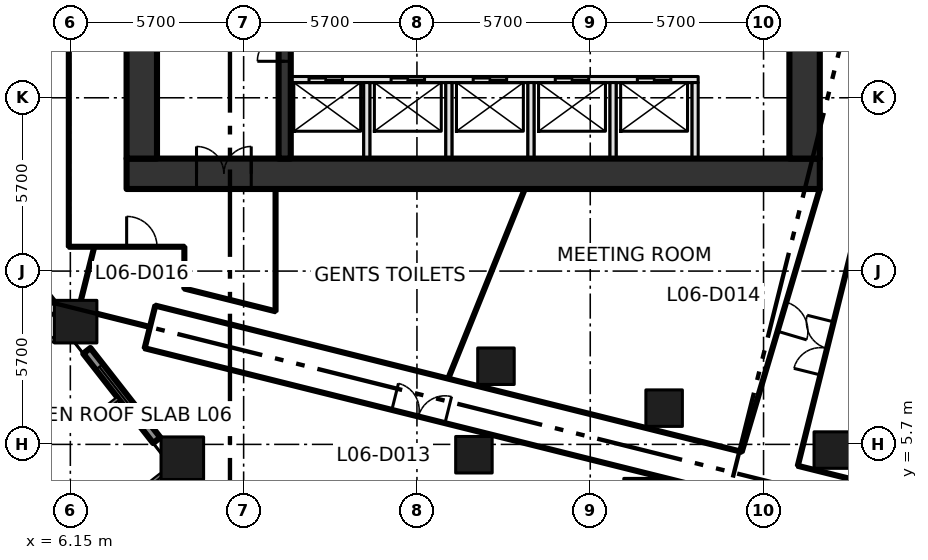
"""IFC4 building model, lengths in metres.
Left out: names, types, materials, properties, quantities, classifications, styles, units other than length and angle.
Written with IfcOpenShell. Run it as: python <this file> out.ifc"""

import sys

from ifc_helpers import new_model, si_unit, direction, frame, frame_2d, origin, origin_2d, place, context, subcontext, project, spatial, rectangle, extrude, element, fill, save


model = new_model("IFC4")
c1 = context("Model", 3, precision=1e-05, world=origin(), true_north=direction((0.0, 1.0)))
c2 = subcontext(c1, "Body", "Model", "MODEL_VIEW")
j1 = project(units=[si_unit("LENGTHUNIT", "METRE"), si_unit("PLANEANGLEUNIT", "RADIAN")], contexts=[c1])
p1 = place(None, origin())
s1 = spatial("IfcSite", under=j1, at=p1, CompositionType="ELEMENT")
p2 = place(p1, origin())
s2 = spatial("IfcBuilding", under=s1, at=p2, CompositionType="ELEMENT")
p3 = place(p2, frame((0.0, 0.0, 33.0)))
s3 = spatial("IfcBuildingStorey", under=s2, at=p3, CompositionType="ELEMENT", Elevation=33.0)
for number, where, z_axis, x_axis in (
    (1, (9.833, 5.245, 0.0), (0.0, 0.0, 1.0), (1.0, 0.0, 0.0)),
    (2, (6.323, 9.737, 0.0), (0.0, 0.0, 1.0), (1.0, 0.0, 0.0)),
):
    element("IfcColumn", number, at=place(p3, frame(where, z_axis=z_axis, x_axis=x_axis)), inside=s3, PredefinedType="COLUMN", context=c2, shape_type="SweptSolid", body=[
        extrude(rectangle(XDim=1.4, YDim=1.4, at=origin_2d()), origin(), (0.0, 0.0, 1.0), 4.2),
    ])
for number, where, z_axis, x_axis in (
    (3, (19.424, 5.36, 0.0), (0.0, 0.0, 1.0), (1.0, 0.0, 0.0)),
    (4, (24.954, 3.981, 0.0), (0.0, 0.0, 1.0), (1.0, 0.0, 0.0)),
    (5, (20.149, 8.271, 0.0), (0.0, 0.0, 1.0), (1.0, 0.0, 0.0)),
    (6, (25.68, 6.892, 0.0), (0.0, 0.0, 1.0), (1.0, 0.0, 0.0)),
    (7, (31.211, 5.513, 0.0), (0.0, 0.0, 1.0), (1.0, 0.0, 0.0)),
):
    element("IfcColumn", number, at=place(p3, frame(where, z_axis=z_axis, x_axis=x_axis)), inside=s3, PredefinedType="COLUMN", context=c2, shape_type="SweptSolid", body=[
        extrude(rectangle(XDim=1.2, YDim=1.2, at=origin_2d()), origin(), (0.0, 0.0, 1.0), 4.2),
    ])
p4 = place(p3, frame((8.0, 14.6, -0.45), z_axis=(0.0, 0.0, 1.0), x_axis=(1.0, 0.0, 0.0)))
e8 = element("IfcWall", 8, at=p4, inside=s3, PredefinedType="SHEAR", context=c2, shape_type="SweptSolid", body=[
    extrude(rectangle(XDim=22.8, YDim=1.0, at=frame_2d((11.4, 0.0))), origin(), (0.0, 0.0, 1.0), 4.35),
])
p5 = place(p4, frame((2.3, 0.0, 0.45)))
e9 = element("IfcOpeningElement", 9, at=p5, cuts=e8, PredefinedType="OPENING", context=c2, shape_type="SweptSolid", body=[
    extrude(rectangle(XDim=1.8, YDim=2.1, at=frame_2d((0.9, 1.05))), frame((0.0, 0.51, 0.0), z_axis=(0.0, -1.0, 0.0), x_axis=(1.0, 0.0, 0.0)), (0.0, 0.0, 1.0), 1.02),
])
for number, where, z_axis, x_axis in (
    (10, (8.5, 15.1, -0.45), (0.0, 0.0, 1.0), (0.0, 1.0, 0.0)),
    (11, (30.3, 15.1, -0.45), (0.0, 0.0, 1.0), (0.0, 1.0, 0.0)),
):
    element("IfcWall", number, at=place(p3, frame(where, z_axis=z_axis, x_axis=x_axis)), inside=s3, PredefinedType="SHEAR", context=c2, shape_type="SweptSolid", body=[
        extrude(rectangle(XDim=20.6, YDim=1.0, at=frame_2d((10.3, 0.0))), origin(), (0.0, 0.0, 1.0), 4.35),
    ])
p6 = place(p3, frame((13.4, 17.7, 0.0), z_axis=(0.0, 0.0, 1.0), x_axis=(1.0, 0.0, 0.0)))
e12 = element("IfcWall", 12, at=p6, inside=s3, PredefinedType="SOLIDWALL", context=c2, shape_type="SweptSolid", body=[
    extrude(rectangle(XDim=13.4, YDim=0.2, at=frame_2d((6.7, 0.0))), origin(), (0.0, 0.0, 1.0), 3.9),
])
p7 = place(p6, frame((0.6, 0.0, 0.0)))
e13 = element("IfcOpeningElement", 13, at=p7, cuts=e12, PredefinedType="OPENING", context=c2, shape_type="SweptSolid", body=[
    extrude(rectangle(XDim=1.1, YDim=2.1, at=frame_2d((0.55, 1.05))), frame((0.0, 0.11, 0.0), z_axis=(0.0, -1.0, 0.0), x_axis=(1.0, 0.0, 0.0)), (0.0, 0.0, 1.0), 0.22),
])
p8 = place(p6, frame((3.3, 0.0, 0.0)))
e14 = element("IfcOpeningElement", 14, at=p8, cuts=e12, PredefinedType="OPENING", context=c2, shape_type="SweptSolid", body=[
    extrude(rectangle(XDim=1.1, YDim=2.1, at=frame_2d((0.55, 1.05))), frame((0.0, 0.11, 0.0), z_axis=(0.0, -1.0, 0.0), x_axis=(1.0, 0.0, 0.0)), (0.0, 0.0, 1.0), 0.22),
])
p9 = place(p6, frame((6.0, 0.0, 0.0)))
e15 = element("IfcOpeningElement", 15, at=p9, cuts=e12, PredefinedType="OPENING", context=c2, shape_type="SweptSolid", body=[
    extrude(rectangle(XDim=1.1, YDim=2.1, at=frame_2d((0.55, 1.05))), frame((0.0, 0.11, 0.0), z_axis=(0.0, -1.0, 0.0), x_axis=(1.0, 0.0, 0.0)), (0.0, 0.0, 1.0), 0.22),
])
p10 = place(p6, frame((8.7, 0.0, 0.0)))
e16 = element("IfcOpeningElement", 16, at=p10, cuts=e12, PredefinedType="OPENING", context=c2, shape_type="SweptSolid", body=[
    extrude(rectangle(XDim=1.1, YDim=2.1, at=frame_2d((0.55, 1.05))), frame((0.0, 0.11, 0.0), z_axis=(0.0, -1.0, 0.0), x_axis=(1.0, 0.0, 0.0)), (0.0, 0.0, 1.0), 0.22),
])
p11 = place(p6, frame((11.4, 0.0, 0.0)))
e17 = element("IfcOpeningElement", 17, at=p11, cuts=e12, PredefinedType="OPENING", context=c2, shape_type="SweptSolid", body=[
    extrude(rectangle(XDim=1.1, YDim=2.1, at=frame_2d((0.55, 1.05))), frame((0.0, 0.11, 0.0), z_axis=(0.0, -1.0, 0.0), x_axis=(1.0, 0.0, 0.0)), (0.0, 0.0, 1.0), 0.22),
])
p12 = place(p3, frame((13.2, 15.1, 0.0), z_axis=(0.0, 0.0, 1.0), x_axis=(0.0, 1.0, 0.0)))
e18 = element("IfcWall", 18, at=p12, inside=s3, PredefinedType="SHEAR", context=c2, shape_type="SweptSolid", body=[
    extrude(rectangle(XDim=20.6, YDim=0.4, at=frame_2d((10.3, 0.0))), origin(), (0.0, 0.0, 1.0), 3.9),
])
p13 = place(p12, frame((3.2, 0.0, 0.0)))
e19 = element("IfcOpeningElement", 19, at=p13, cuts=e18, PredefinedType="OPENING", context=c2, shape_type="SweptSolid", body=[
    extrude(rectangle(XDim=1.8, YDim=2.1, at=frame_2d((0.9, 1.05))), frame((0.0, 0.21, 0.0), z_axis=(0.0, -1.0, 0.0), x_axis=(1.0, 0.0, 0.0)), (0.0, 0.0, 1.0), 0.42),
])
p14 = place(p12, frame((11.3, 0.0, 0.0)))
e20 = element("IfcOpeningElement", 20, at=p14, cuts=e18, PredefinedType="OPENING", context=c2, shape_type="SweptSolid", body=[
    extrude(rectangle(XDim=1.2, YDim=2.1, at=frame_2d((0.6, 1.05))), frame((0.0, 0.21, 0.0), z_axis=(0.0, -1.0, 0.0), x_axis=(1.0, 0.0, 0.0)), (0.0, 0.0, 1.0), 0.42),
])
for number, where, z_axis, x_axis in (
    (21, (15.9, 15.1, 0.0), (0.0, 0.0, 1.0), (0.0, 1.0, 0.0)),
    (22, (18.6, 15.1, 0.0), (0.0, 0.0, 1.0), (0.0, 1.0, 0.0)),
    (23, (21.3, 15.1, 0.0), (0.0, 0.0, 1.0), (0.0, 1.0, 0.0)),
    (24, (24.0, 15.1, 0.0), (0.0, 0.0, 1.0), (0.0, 1.0, 0.0)),
    (25, (26.7, 15.1, 0.0), (0.0, 0.0, 1.0), (0.0, 1.0, 0.0)),
):
    element("IfcWall", number, at=place(p3, frame(where, z_axis=z_axis, x_axis=x_axis)), inside=s3, PredefinedType="SOLIDWALL", context=c2, shape_type="SweptSolid", body=[
        extrude(rectangle(XDim=2.5, YDim=0.2, at=frame_2d((1.25, 0.0))), origin(), (0.0, 0.0, 1.0), 3.9),
    ])
p15 = place(p3, frame((3.183, 13.27, 0.0), z_axis=(0.0, 0.0, 1.0), x_axis=(0.615564114897, -0.788086810225, 0.0)))
e26 = element("IfcWall", 26, at=p15, inside=s3, PredefinedType="SOLIDWALL", context=c2, shape_type="SweptSolid", body=[
    extrude(rectangle(XDim=3.735, YDim=0.3, at=frame_2d((1.867, 0.0))), origin(), (0.0, 0.0, 1.0), 3.1),
])
p16 = place(p15, frame((0.667, 0.0, 0.8)))
e27 = element("IfcOpeningElement", 27, at=p16, cuts=e26, PredefinedType="OPENING", context=c2, shape_type="SweptSolid", body=[
    extrude(rectangle(XDim=2.4, YDim=2.1, at=frame_2d((1.2, 1.05))), frame((0.0, 0.16, 0.0), z_axis=(0.0, -1.0, 0.0), x_axis=(1.0, 0.0, 0.0)), (0.0, 0.0, 1.0), 0.32),
])
p17 = place(p3, frame((6.692, 8.778, 0.0), z_axis=(0.0, 0.0, 1.0), x_axis=(0.615767067156, -0.787928244833, 0.0)))
e28 = element("IfcWall", 28, at=p17, inside=s3, PredefinedType="SOLIDWALL", context=c2, shape_type="SweptSolid", body=[
    extrude(rectangle(XDim=3.735, YDim=0.3, at=frame_2d((1.868, 0.0))), origin(), (0.0, 0.0, 1.0), 3.1),
])
p18 = place(p17, frame((0.668, 0.0, 0.8)))
e29 = element("IfcOpeningElement", 29, at=p18, cuts=e28, PredefinedType="OPENING", context=c2, shape_type="SweptSolid", body=[
    extrude(rectangle(XDim=2.4, YDim=2.1, at=frame_2d((1.2, 1.05))), frame((0.0, 0.16, 0.0), z_axis=(0.0, -1.0, 0.0), x_axis=(1.0, 0.0, 0.0)), (0.0, 0.0, 1.0), 0.32),
])
p19 = place(p3, frame((11.707, -11.659, 0.0), z_axis=(0.0, 0.0, 1.0), x_axis=(-0.61565155533, 0.788018503856, 0.0)))
e30 = element("IfcWall", 30, at=p19, inside=s3, PredefinedType="PARAPET", context=c2, shape_type="SweptSolid", body=[
    extrude(rectangle(XDim=32.79, YDim=0.25, at=frame_2d((16.395, 0.0))), origin(), (0.0, 0.0, 1.0), 1.2),
])
p20 = place(p3, frame((6.1, 12.2, 0.0), z_axis=(0.0, 0.0, 1.0), x_axis=(1.0, 0.0, 0.0)))
e31 = element("IfcWall", 31, at=p20, inside=s3, PredefinedType="PARTITIONING", context=c2, shape_type="SweptSolid", body=[
    extrude(rectangle(XDim=3.8, YDim=0.1, at=frame_2d((1.9, 0.0))), origin(), (0.0, 0.0, 1.0), 3.9),
])
p21 = place(p20, frame((1.902, 0.0, 0.0)))
e32 = element("IfcOpeningElement", 32, at=p21, cuts=e31, PredefinedType="OPENING", context=c2, shape_type="SweptSolid", body=[
    extrude(rectangle(XDim=1.0, YDim=2.1, at=frame_2d((0.5, 1.05))), frame((0.0, 0.06, 0.0), z_axis=(0.0, -1.0, 0.0), x_axis=(1.0, 0.0, 0.0)), (0.0, 0.0, 1.0), 0.12),
])
p22 = place(p3, frame((6.1, 38.9, 0.0), z_axis=(0.0, 0.0, 1.0), x_axis=(0.0, -1.0, 0.0)))
e33 = element("IfcWall", 33, at=p22, inside=s3, PredefinedType="PARTITIONING", context=c2, shape_type="SweptSolid", body=[
    extrude(rectangle(XDim=26.7, YDim=0.1, at=frame_2d((13.35, 0.0))), origin(), (0.0, 0.0, 1.0), 3.9),
])
p23 = place(p22, frame((18.568, 0.0, 0.0)))
e34 = element("IfcOpeningElement", 34, at=p23, cuts=e33, PredefinedType="OPENING", context=c2, shape_type="SweptSolid", body=[
    extrude(rectangle(XDim=1.0, YDim=2.1, at=frame_2d((0.5, 1.05))), frame((0.0, 0.06, 0.0), z_axis=(0.0, -1.0, 0.0), x_axis=(1.0, 0.0, 0.0)), (0.0, 0.0, 1.0), 0.12),
])
p24 = place(p22, frame((4.68, 0.0, 0.0)))
e35 = element("IfcOpeningElement", 35, at=p24, cuts=e33, PredefinedType="OPENING", context=c2, shape_type="SweptSolid", body=[
    extrude(rectangle(XDim=1.8, YDim=2.1, at=frame_2d((0.9, 1.05))), frame((0.0, 0.06, 0.0), z_axis=(0.0, -1.0, 0.0), x_axis=(1.0, 0.0, 0.0)), (0.0, 0.0, 1.0), 0.12),
])
p25 = place(p3, frame((8.594, 8.862, 0.0), z_axis=(0.0, 0.0, 1.0), x_axis=(0.970293746648, -0.241929835316, 0.0)))
e36 = element("IfcWall", 36, at=p25, inside=s3, PredefinedType="PARTITIONING", context=c2, shape_type="SweptSolid", body=[
    extrude(rectangle(XDim=68.375, YDim=0.1, at=frame_2d((34.188, 0.0))), origin(), (0.0, 0.0, 1.0), 3.9),
])
p26 = place(p25, frame((37.708, 0.0, 0.0)))
e37 = element("IfcOpeningElement", 37, at=p26, cuts=e36, PredefinedType="OPENING", context=c2, shape_type="SweptSolid", body=[
    extrude(rectangle(XDim=1.0, YDim=2.1, at=frame_2d((0.5, 1.05))), frame((0.0, 0.06, 0.0), z_axis=(0.0, -1.0, 0.0), x_axis=(1.0, 0.0, 0.0)), (0.0, 0.0, 1.0), 0.12),
])
p27 = place(p25, frame((42.708, 0.0, 0.0)))
e38 = element("IfcOpeningElement", 38, at=p27, cuts=e36, PredefinedType="OPENING", context=c2, shape_type="SweptSolid", body=[
    extrude(rectangle(XDim=1.8, YDim=2.1, at=frame_2d((0.9, 1.05))), frame((0.0, 0.06, 0.0), z_axis=(0.0, -1.0, 0.0), x_axis=(1.0, 0.0, 0.0)), (0.0, 0.0, 1.0), 0.12),
])
p28 = place(p25, frame((58.508, 0.0, 0.0)))
e39 = element("IfcOpeningElement", 39, at=p28, cuts=e36, PredefinedType="OPENING", context=c2, shape_type="SweptSolid", body=[
    extrude(rectangle(XDim=1.8, YDim=2.1, at=frame_2d((0.9, 1.05))), frame((0.0, 0.06, 0.0), z_axis=(0.0, -1.0, 0.0), x_axis=(1.0, 0.0, 0.0)), (0.0, 0.0, 1.0), 0.12),
])
p29 = place(p25, frame((25.408, 0.0, 0.0)))
e40 = element("IfcOpeningElement", 40, at=p29, cuts=e36, PredefinedType="OPENING", context=c2, shape_type="SweptSolid", body=[
    extrude(rectangle(XDim=1.8, YDim=2.1, at=frame_2d((0.9, 1.05))), frame((0.0, 0.06, 0.0), z_axis=(0.0, -1.0, 0.0), x_axis=(1.0, 0.0, 0.0)), (0.0, 0.0, 1.0), 0.12),
])
p30 = place(p25, frame((31.308, 0.0, 0.0)))
e41 = element("IfcOpeningElement", 41, at=p30, cuts=e36, PredefinedType="OPENING", context=c2, shape_type="SweptSolid", body=[
    extrude(rectangle(XDim=1.0, YDim=2.1, at=frame_2d((0.5, 1.05))), frame((0.0, 0.06, 0.0), z_axis=(0.0, -1.0, 0.0), x_axis=(1.0, 0.0, 0.0)), (0.0, 0.0, 1.0), 0.12),
])
p31 = place(p25, frame((8.38, 0.0, 0.0)))
e42 = element("IfcOpeningElement", 42, at=p31, cuts=e36, PredefinedType="OPENING", context=c2, shape_type="SweptSolid", body=[
    extrude(rectangle(XDim=1.8, YDim=2.1, at=frame_2d((0.9, 1.05))), frame((0.0, 0.06, 0.0), z_axis=(0.0, -1.0, 0.0), x_axis=(1.0, 0.0, 0.0)), (0.0, 0.0, 1.0), 0.12),
])
p32 = place(p3, frame((8.944, 10.264, 0.0), z_axis=(0.0, 0.0, 1.0), x_axis=(0.970300504447, -0.241902730595, 0.0)))
e43 = element("IfcWall", 43, at=p32, inside=s3, PredefinedType="PARTITIONING", context=c2, shape_type="SweptSolid", body=[
    extrude(rectangle(XDim=19.879, YDim=0.1, at=frame_2d((9.939, 0.0))), origin(), (0.0, 0.0, 1.0), 3.9),
])
p33 = place(p3, frame((8.944, 10.264, 0.0), z_axis=(0.0, 0.0, 1.0), x_axis=(-0.242297077633, -0.970202105837, 0.0)))
e44 = element("IfcWall", 44, at=p33, inside=s3, PredefinedType="PARTITIONING", context=c2, shape_type="SweptSolid", body=[
    extrude(rectangle(XDim=1.445, YDim=0.1, at=frame_2d((0.722, 0.0))), origin(), (0.0, 0.0, 1.0), 3.9),
])
p34 = place(p3, frame((9.9, 10.826, 0.0), z_axis=(0.0, 0.0, 1.0), x_axis=(0.970290953223, -0.241941038466, 0.0)))
e45 = element("IfcWall", 45, at=p34, inside=s3, PredefinedType="PARTITIONING", context=c2, shape_type="SweptSolid", body=[
    extrude(rectangle(XDim=3.092, YDim=0.1, at=frame_2d((1.546, 0.0))), origin(), (0.0, 0.0, 1.0), 3.9),
])
p35 = place(p3, frame((9.9, 12.2, 0.0), z_axis=(0.0, 0.0, 1.0), x_axis=(0.0, -1.0, 0.0)))
e46 = element("IfcWall", 46, at=p35, inside=s3, PredefinedType="PARTITIONING", context=c2, shape_type="SweptSolid", body=[
    extrude(rectangle(XDim=1.374, YDim=0.1, at=frame_2d((0.687, 0.0))), origin(), (0.0, 0.0, 1.0), 3.9),
])
p36 = place(p3, frame((12.9, 10.078, 0.0), z_axis=(0.0, 0.0, 1.0), x_axis=(0.0, 1.0, 0.0)))
e47 = element("IfcWall", 47, at=p36, inside=s3, PredefinedType="PARTITIONING", context=c2, shape_type="SweptSolid", body=[
    extrude(rectangle(XDim=4.022, YDim=0.1, at=frame_2d((2.011, 0.0))), origin(), (0.0, 0.0, 1.0), 3.9),
])
p37 = place(p3, frame((30.076, 4.995, 0.0), z_axis=(0.0, 0.0, 1.0), x_axis=(0.97029302478, -0.24193273045, 0.0)))
e48 = element("IfcWall", 48, at=p37, inside=s3, PredefinedType="PARTITIONING", context=c2, shape_type="SweptSolid", body=[
    extrude(rectangle(XDim=46.596, YDim=0.1, at=frame_2d((23.298, 0.0))), origin(), (0.0, 0.0, 1.0), 3.9),
])
p38 = place(p37, frame((25.229, 0.0, 0.0)))
e49 = element("IfcOpeningElement", 49, at=p38, cuts=e48, PredefinedType="OPENING", context=c2, shape_type="SweptSolid", body=[
    extrude(rectangle(XDim=1.0, YDim=2.1, at=frame_2d((0.5, 1.05))), frame((0.0, 0.06, 0.0), z_axis=(0.0, -1.0, 0.0), x_axis=(1.0, 0.0, 0.0)), (0.0, 0.0, 1.0), 0.12),
])
p39 = place(p37, frame((31.828, 0.0, 0.0)))
e50 = element("IfcOpeningElement", 50, at=p39, cuts=e48, PredefinedType="OPENING", context=c2, shape_type="SweptSolid", body=[
    extrude(rectangle(XDim=1.8, YDim=2.1, at=frame_2d((0.9, 1.05))), frame((0.0, 0.06, 0.0), z_axis=(0.0, -1.0, 0.0), x_axis=(1.0, 0.0, 0.0)), (0.0, 0.0, 1.0), 0.12),
])
p40 = place(p37, frame((42.429, 0.0, 0.0)))
e51 = element("IfcOpeningElement", 51, at=p40, cuts=e48, PredefinedType="OPENING", context=c2, shape_type="SweptSolid", body=[
    extrude(rectangle(XDim=1.0, YDim=2.1, at=frame_2d((0.5, 1.05))), frame((0.0, 0.06, 0.0), z_axis=(0.0, -1.0, 0.0), x_axis=(1.0, 0.0, 0.0)), (0.0, 0.0, 1.0), 0.12),
])
p41 = place(p37, frame((14.629, 0.0, 0.0)))
e52 = element("IfcOpeningElement", 52, at=p41, cuts=e48, PredefinedType="OPENING", context=c2, shape_type="SweptSolid", body=[
    extrude(rectangle(XDim=1.8, YDim=2.1, at=frame_2d((0.9, 1.05))), frame((0.0, 0.06, 0.0), z_axis=(0.0, -1.0, 0.0), x_axis=(1.0, 0.0, 0.0)), (0.0, 0.0, 1.0), 0.12),
])
p42 = place(p3, frame((30.076, 4.995, 0.0), z_axis=(0.0, 0.0, 1.0), x_axis=(0.241944155572, 0.97029017597, 0.0)))
e53 = element("IfcWall", 53, at=p42, inside=s3, PredefinedType="PARTITIONING", context=c2, shape_type="SweptSolid", body=[
    extrude(rectangle(XDim=8.353, YDim=0.1, at=frame_2d((4.177, 0.0))), origin(), (0.0, 0.0, 1.0), 3.9),
])
p43 = place(p42, frame((3.08, 0.0, 0.0)))
e54 = element("IfcOpeningElement", 54, at=p43, cuts=e53, PredefinedType="OPENING", context=c2, shape_type="SweptSolid", body=[
    extrude(rectangle(XDim=1.8, YDim=2.1, at=frame_2d((0.9, 1.05))), frame((0.0, 0.06, 0.0), z_axis=(0.0, -1.0, 0.0), x_axis=(1.0, 0.0, 0.0)), (0.0, 0.0, 1.0), 0.12),
])
p44 = place(p3, frame((30.8, 14.1, 0.0), z_axis=(0.0, 0.0, 1.0), x_axis=(-0.284664373847, -0.95862724469, 0.0)))
e55 = element("IfcWall", 55, at=p44, inside=s3, PredefinedType="PARTITIONING", context=c2, shape_type="SweptSolid", body=[
    extrude(rectangle(XDim=9.018, YDim=0.1, at=frame_2d((4.509, 0.0))), origin(), (0.0, 0.0, 1.0), 3.9),
])
p45 = place(p44, frame((3.88, 0.0, 0.0)))
e56 = element("IfcOpeningElement", 56, at=p45, cuts=e55, PredefinedType="OPENING", context=c2, shape_type="SweptSolid", body=[
    extrude(rectangle(XDim=1.0, YDim=2.1, at=frame_2d((0.5, 1.05))), frame((0.0, 0.06, 0.0), z_axis=(0.0, -1.0, 0.0), x_axis=(1.0, 0.0, 0.0)), (0.0, 0.0, 1.0), 0.12),
])
p46 = place(p3, frame((6.922, 12.138, 0.0), z_axis=(0.0, 0.0, 1.0), x_axis=(-0.242437328426, -0.970167069007, 0.0)))
e57 = element("IfcWall", 57, at=p46, inside=s3, PredefinedType="PARTITIONING", context=c2, shape_type="SweptSolid", body=[
    extrude(rectangle(XDim=1.753, YDim=0.1, at=frame_2d((0.876, 0.0))), origin(), (0.0, 0.0, 1.0), 3.9),
])
p47 = place(p3, frame((8.72, 9.574, 0.0), z_axis=(0.0, 0.0, 1.0), x_axis=(-0.97016712555, 0.242437102155, 0.0)))
e58 = element("IfcWall", 58, at=p47, inside=s3, PredefinedType="PARTITIONING", context=c2, shape_type="SweptSolid", body=[
    extrude(rectangle(XDim=1.749, YDim=0.1, at=frame_2d((0.875, 0.0))), origin(), (0.0, 0.0, 1.0), 3.9),
])
p48 = place(p3, frame((18.599, 7.915, 0.0), z_axis=(0.0, 0.0, 1.0), x_axis=(0.374461839275, 0.927242325892, 0.0)))
e59 = element("IfcWall", 59, at=p48, inside=s3, PredefinedType="PARTITIONING", context=c2, shape_type="SweptSolid", body=[
    extrude(rectangle(XDim=6.67, YDim=0.1, at=frame_2d((3.335, 0.0))), origin(), (0.0, 0.0, 1.0), 3.9),
])
p49 = place(p7, origin())
e60 = element("IfcDoor", 60, at=p49, inside=s3, OperationType="SLIDING_TO_LEFT", PredefinedType="DOOR", context=c2, shape_type="SweptSolid", body=[
    extrude(rectangle(XDim=1.1, YDim=2.1, at=frame_2d((0.55, 1.05))), frame((0.0, 0.025, 0.0), z_axis=(0.0, -1.0, 0.0), x_axis=(1.0, 0.0, 0.0)), (0.0, 0.0, 1.0), 0.05),
])
fill(e13, e60)
p50 = place(p8, origin())
e61 = element("IfcDoor", 61, at=p50, inside=s3, OperationType="SLIDING_TO_LEFT", PredefinedType="DOOR", context=c2, shape_type="SweptSolid", body=[
    extrude(rectangle(XDim=1.1, YDim=2.1, at=frame_2d((0.55, 1.05))), frame((0.0, 0.025, 0.0), z_axis=(0.0, -1.0, 0.0), x_axis=(1.0, 0.0, 0.0)), (0.0, 0.0, 1.0), 0.05),
])
fill(e14, e61)
p51 = place(p9, origin())
e62 = element("IfcDoor", 62, at=p51, inside=s3, OperationType="SLIDING_TO_LEFT", PredefinedType="DOOR", context=c2, shape_type="SweptSolid", body=[
    extrude(rectangle(XDim=1.1, YDim=2.1, at=frame_2d((0.55, 1.05))), frame((0.0, 0.025, 0.0), z_axis=(0.0, -1.0, 0.0), x_axis=(1.0, 0.0, 0.0)), (0.0, 0.0, 1.0), 0.05),
])
fill(e15, e62)
p52 = place(p10, origin())
e63 = element("IfcDoor", 63, at=p52, inside=s3, OperationType="SLIDING_TO_LEFT", PredefinedType="DOOR", context=c2, shape_type="SweptSolid", body=[
    extrude(rectangle(XDim=1.1, YDim=2.1, at=frame_2d((0.55, 1.05))), frame((0.0, 0.025, 0.0), z_axis=(0.0, -1.0, 0.0), x_axis=(1.0, 0.0, 0.0)), (0.0, 0.0, 1.0), 0.05),
])
fill(e16, e63)
p53 = place(p11, origin())
e64 = element("IfcDoor", 64, at=p53, inside=s3, OperationType="SLIDING_TO_LEFT", PredefinedType="DOOR", context=c2, shape_type="SweptSolid", body=[
    extrude(rectangle(XDim=1.1, YDim=2.1, at=frame_2d((0.55, 1.05))), frame((0.0, 0.025, 0.0), z_axis=(0.0, -1.0, 0.0), x_axis=(1.0, 0.0, 0.0)), (0.0, 0.0, 1.0), 0.05),
])
fill(e17, e64)
p54 = place(p13, origin())
e65 = element("IfcDoor", 65, at=p54, inside=s3, OperationType="DOUBLE_DOOR_SINGLE_SWING", PredefinedType="DOOR", context=c2, shape_type="SweptSolid", body=[
    extrude(rectangle(XDim=1.8, YDim=2.1, at=frame_2d((0.9, 1.05))), frame((0.0, 0.025, 0.0), z_axis=(0.0, -1.0, 0.0), x_axis=(1.0, 0.0, 0.0)), (0.0, 0.0, 1.0), 0.05),
])
fill(e19, e65)
p55 = place(p5, origin())
e66 = element("IfcDoor", 66, at=p55, inside=s3, OperationType="DOUBLE_DOOR_SINGLE_SWING", PredefinedType="DOOR", context=c2, shape_type="SweptSolid", body=[
    extrude(rectangle(XDim=1.8, YDim=2.1, at=frame_2d((0.9, 1.05))), frame((0.0, 0.025, 0.0), z_axis=(0.0, -1.0, 0.0), x_axis=(1.0, 0.0, 0.0)), (0.0, 0.0, 1.0), 0.05),
])
fill(e9, e66)
p56 = place(p18, origin())
e67 = element("IfcWindow", 67, at=p56, inside=s3, PartitioningType="DOUBLE_PANEL_VERTICAL", PredefinedType="WINDOW", context=c2, shape_type="SweptSolid", body=[
    extrude(rectangle(XDim=2.4, YDim=2.1, at=frame_2d((1.2, 1.05))), frame((0.0, 0.03, 0.0), z_axis=(0.0, -1.0, 0.0), x_axis=(1.0, 0.0, 0.0)), (0.0, 0.0, 1.0), 0.06),
])
fill(e29, e67)
p57 = place(p31, origin())
e68 = element("IfcDoor", 68, at=p57, inside=s3, OperationType="DOUBLE_DOOR_SINGLE_SWING", PredefinedType="DOOR", context=c2, shape_type="SweptSolid", body=[
    extrude(rectangle(XDim=1.8, YDim=2.1, at=frame_2d((0.9, 1.05))), frame((0.0, 0.025, 0.0), z_axis=(0.0, -1.0, 0.0), x_axis=(1.0, 0.0, 0.0)), (0.0, 0.0, 1.0), 0.05),
])
fill(e42, e68)
p58 = place(p45, origin())
e69 = element("IfcDoor", 69, at=p58, inside=s3, OperationType="SINGLE_SWING_RIGHT", PredefinedType="DOOR", context=c2, shape_type="SweptSolid", body=[
    extrude(rectangle(XDim=1.0, YDim=2.1, at=frame_2d((0.5, 1.05))), frame((0.0, 0.025, 0.0), z_axis=(0.0, -1.0, 0.0), x_axis=(1.0, 0.0, 0.0)), (0.0, 0.0, 1.0), 0.05),
])
fill(e56, e69)
p59 = place(p43, origin())
e70 = element("IfcDoor", 70, at=p59, inside=s3, OperationType="DOUBLE_DOOR_SINGLE_SWING", PredefinedType="DOOR", context=c2, shape_type="SweptSolid", body=[
    extrude(rectangle(XDim=1.8, YDim=2.1, at=frame_2d((0.9, 1.05))), frame((0.0, 0.025, 0.0), z_axis=(0.0, -1.0, 0.0), x_axis=(1.0, 0.0, 0.0)), (0.0, 0.0, 1.0), 0.05),
])
fill(e54, e70)
p60 = place(p21, origin())
e71 = element("IfcDoor", 71, at=p60, inside=s3, OperationType="SINGLE_SWING_LEFT", PredefinedType="DOOR", context=c2, shape_type="SweptSolid", body=[
    extrude(rectangle(XDim=1.0, YDim=2.1, at=frame_2d((0.5, 1.05))), frame((0.0, 0.025, 0.0), z_axis=(0.0, -1.0, 0.0), x_axis=(1.0, 0.0, 0.0)), (0.0, 0.0, 1.0), 0.05),
])
fill(e32, e71)
save(model, sys.argv[1])
